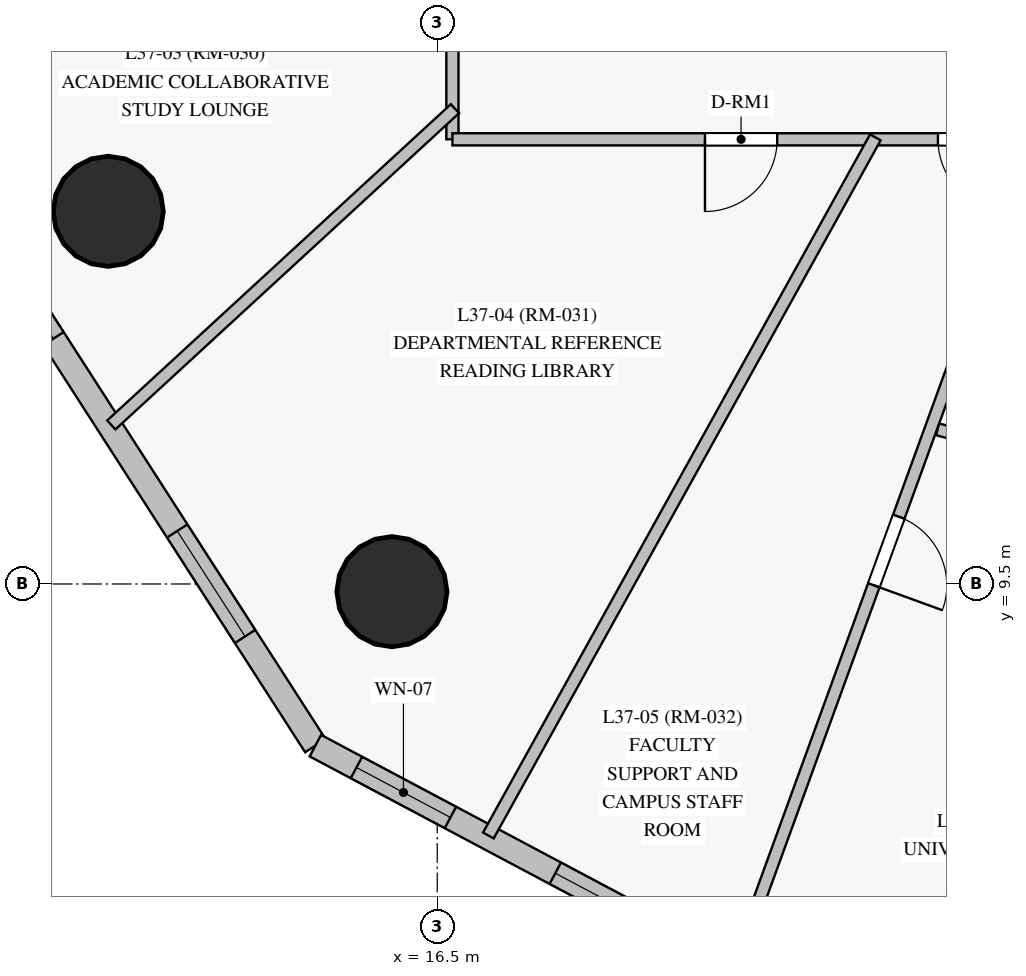
"""IFC4 building model, lengths in metres.
Left out: names, types, materials, properties, quantities, classifications, styles, units other than length and angle.
Written with IfcOpenShell. Run it as: python <this file> out.ifc"""

import sys

from ifc_helpers import new_model, si_unit, direction, frame, frame_2d, origin, origin_with_axes, origin_2d, place, context, subcontext, project, spatial, rectangle, circle, extrude, source, transform, mapped, element, fill, save


model = new_model("IFC4")
c1 = context("Model", 3, precision=1e-05, world=origin(), true_north=direction((0.0, 1.0)))
c2 = subcontext(c1, "Body", "Model", "MODEL_VIEW")
j1 = project(units=[si_unit("LENGTHUNIT", "METRE"), si_unit("PLANEANGLEUNIT", "RADIAN")], contexts=[c1])
p1 = place(None, origin())
s1 = spatial("IfcSite", under=j1, at=p1, CompositionType="ELEMENT")
p2 = place(p1, origin())
s2 = spatial("IfcBuilding", under=s1, at=p2, CompositionType="ELEMENT")
p3 = place(p2, frame((0.0, 0.0, 132.8)))
s3 = spatial("IfcBuildingStorey", under=s2, at=p3, CompositionType="ELEMENT", Elevation=132.8)
m1 = source(origin_with_axes(), c2, "Body", "SweptSolid", [
    extrude(circle(Radius=0.725, at=origin_2d()), origin(), (0.0, 0.0, 1.0), 3.05),
])
for number, where, z_axis, x_axis in (
    (1, (12.172, 14.403, 0.0), (0.0, 0.0, 1.0), (1.0, 0.0, 0.0)),
    (2, (15.904, 9.399, 0.0), (0.0, 0.0, 1.0), (1.0, 0.0, 0.0)),
):
    element("IfcColumn", number, at=place(p3, frame(where, z_axis=z_axis, x_axis=x_axis)), inside=s3, PredefinedType="COLUMN", context=c2, shape_type="MappedRepresentation", body=[
        mapped(m1, transform((0.0, 0.0, 0.0), scale=1.0)),
    ])
p4 = place(p3, frame((9.789, 15.31, 0.0), z_axis=(0.0, 0.0, 1.0), x_axis=(0.541166732634, -0.840915315291, 0.0)))
e3 = element("IfcWall", 3, at=p4, inside=s3, PredefinedType="SOLIDWALL", context=c2, shape_type="SweptSolid", body=[
    extrude(rectangle(XDim=9.438, YDim=0.32, at=frame_2d((4.719, 0.0))), origin(), (0.0, 0.0, 1.0), 2.825),
])
p5 = place(p4, frame((1.421, 0.0, 0.85)))
e4 = element("IfcOpeningElement", 4, at=p5, cuts=e3, PredefinedType="OPENING", context=c2, shape_type="SweptSolid", body=[
    extrude(rectangle(XDim=1.65, YDim=1.65, at=frame_2d((0.825, 0.825))), frame((0.0, 0.17, 0.0), z_axis=(0.0, -1.0, 0.0), x_axis=(1.0, 0.0, 0.0)), (0.0, 0.0, 1.0), 0.34),
])
p6 = place(p4, frame((6.08, 0.0, 0.85)))
e5 = element("IfcOpeningElement", 5, at=p6, cuts=e3, PredefinedType="OPENING", context=c2, shape_type="SweptSolid", body=[
    extrude(rectangle(XDim=1.65, YDim=1.65, at=frame_2d((0.825, 0.825))), frame((0.0, 0.17, 0.0), z_axis=(0.0, -1.0, 0.0), x_axis=(1.0, 0.0, 0.0)), (0.0, 0.0, 1.0), 0.34),
])
p7 = place(p3, frame((14.897, 7.373, 0.0), z_axis=(0.0, 0.0, 1.0), x_axis=(0.882958227075, -0.469451562188, 0.0)))
e6 = element("IfcWall", 6, at=p7, inside=s3, PredefinedType="SOLIDWALL", context=c2, shape_type="SweptSolid", body=[
    extrude(rectangle(XDim=11.765, YDim=0.32, at=frame_2d((5.883, 0.0))), origin(), (0.0, 0.0, 1.0), 2.825),
])
p8 = place(p7, frame((0.613, 0.0, 0.85)))
e7 = element("IfcOpeningElement", 7, at=p8, cuts=e6, PredefinedType="OPENING", context=c2, shape_type="SweptSolid", body=[
    extrude(rectangle(XDim=1.4, YDim=1.65, at=frame_2d((0.7, 0.825))), frame((0.0, 0.17, 0.0), z_axis=(0.0, -1.0, 0.0), x_axis=(1.0, 0.0, 0.0)), (0.0, 0.0, 1.0), 0.34),
])
p9 = place(p7, frame((3.575, 0.0, 0.85)))
e8 = element("IfcOpeningElement", 8, at=p9, cuts=e6, PredefinedType="OPENING", context=c2, shape_type="SweptSolid", body=[
    extrude(rectangle(XDim=1.65, YDim=1.65, at=frame_2d((0.825, 0.825))), frame((0.0, 0.17, 0.0), z_axis=(0.0, -1.0, 0.0), x_axis=(1.0, 0.0, 0.0)), (0.0, 0.0, 1.0), 0.34),
])
p10 = place(p7, frame((8.145, 0.0, 0.85)))
e9 = element("IfcOpeningElement", 9, at=p10, cuts=e6, PredefinedType="OPENING", context=c2, shape_type="SweptSolid", body=[
    extrude(rectangle(XDim=1.65, YDim=1.65, at=frame_2d((0.825, 0.825))), frame((0.0, 0.17, 0.0), z_axis=(0.0, -1.0, 0.0), x_axis=(1.0, 0.0, 0.0)), (0.0, 0.0, 1.0), 0.34),
])
p11 = place(p3, frame((16.7, 15.35, 0.0), z_axis=(0.0, 0.0, 1.0), x_axis=(0.0, 1.0, 0.0)))
e10 = element("IfcWall", 10, at=p11, inside=s3, PredefinedType="PARTITIONING", context=c2, shape_type="SweptSolid", body=[
    extrude(rectangle(XDim=22.3, YDim=0.16, at=frame_2d((11.15, 0.0))), origin(), (0.0, 0.0, 1.0), 2.225),
])
p12 = place(p11, frame((10.135, 0.0, 0.0)))
e11 = element("IfcOpeningElement", 11, at=p12, cuts=e10, PredefinedType="OPENING", context=c2, shape_type="SweptSolid", body=[
    extrude(rectangle(XDim=0.96, YDim=2.15, at=frame_2d((0.48, 1.075))), frame((0.0, 0.09, 0.0), z_axis=(0.0, -1.0, 0.0), x_axis=(1.0, 0.0, 0.0)), (0.0, 0.0, 1.0), 0.18),
])
p13 = place(p11, frame((2.104, 0.0, 0.0)))
e12 = element("IfcOpeningElement", 12, at=p13, cuts=e10, PredefinedType="OPENING", context=c2, shape_type="SweptSolid", body=[
    extrude(rectangle(XDim=0.95, YDim=2.15, at=frame_2d((0.475, 1.075))), frame((0.0, 0.09, 0.0), z_axis=(0.0, -1.0, 0.0), x_axis=(1.0, 0.0, 0.0)), (0.0, 0.0, 1.0), 0.18),
])
p14 = place(p11, frame((14.02, 0.0, 0.0)))
e13 = element("IfcOpeningElement", 13, at=p14, cuts=e10, PredefinedType="OPENING", context=c2, shape_type="SweptSolid", body=[
    extrude(rectangle(XDim=0.95, YDim=2.15, at=frame_2d((0.475, 1.075))), frame((0.0, 0.09, 0.0), z_axis=(0.0, -1.0, 0.0), x_axis=(1.0, 0.0, 0.0)), (0.0, 0.0, 1.0), 0.18),
])
p15 = place(p3, frame((24.389, 15.378, 0.0), z_axis=(0.0, 0.0, 1.0), x_axis=(-0.341952384899, -0.93971728007, 0.0)))
e14 = element("IfcWall", 14, at=p15, inside=s3, PredefinedType="PARTITIONING", context=c2, shape_type="SweptSolid", body=[
    extrude(rectangle(XDim=11.612, YDim=0.16, at=frame_2d((5.806, 0.0))), origin(), (0.0, 0.0, 1.0), 2.825),
])
p16 = place(p15, frame((5.313, 0.0, 0.0)))
e15 = element("IfcOpeningElement", 15, at=p16, cuts=e14, PredefinedType="OPENING", context=c2, shape_type="SweptSolid", body=[
    extrude(rectangle(XDim=0.96, YDim=2.15, at=frame_2d((0.48, 1.075))), frame((0.0, 0.09, 0.0), z_axis=(0.0, -1.0, 0.0), x_axis=(1.0, 0.0, 0.0)), (0.0, 0.0, 1.0), 0.18),
])
p17 = place(p3, frame((27.55, 15.35, 0.0), z_axis=(0.0, 0.0, 1.0), x_axis=(-1.0, 0.0, 0.0)))
e16 = element("IfcWall", 16, at=p17, inside=s3, PredefinedType="PARTITIONING", context=c2, shape_type="SweptSolid", body=[
    extrude(rectangle(XDim=10.85, YDim=0.16, at=frame_2d((5.425, 0.0))), origin(), (0.0, 0.0, 1.0), 2.325),
])
p18 = place(p17, frame((6.577, 0.0, 0.0)))
e17 = element("IfcOpeningElement", 17, at=p18, cuts=e16, PredefinedType="OPENING", context=c2, shape_type="SweptSolid", body=[
    extrude(rectangle(XDim=0.95, YDim=2.15, at=frame_2d((0.475, 1.075))), frame((0.0, 0.09, 0.0), z_axis=(0.0, -1.0, 0.0), x_axis=(1.0, 0.0, 0.0)), (0.0, 0.0, 1.0), 0.18),
])
p19 = place(p17, frame((3.512, 0.0, 0.0)))
e18 = element("IfcOpeningElement", 18, at=p19, cuts=e16, PredefinedType="OPENING", context=c2, shape_type="SweptSolid", body=[
    extrude(rectangle(XDim=0.95, YDim=2.15, at=frame_2d((0.475, 1.075))), frame((0.0, 0.09, 0.0), z_axis=(0.0, -1.0, 0.0), x_axis=(1.0, 0.0, 0.0)), (0.0, 0.0, 1.0), 0.18),
])
p20 = place(p17, frame((1.948, 0.0, 0.0)))
e19 = element("IfcOpeningElement", 19, at=p20, cuts=e16, PredefinedType="OPENING", context=c2, shape_type="SweptSolid", body=[
    extrude(rectangle(XDim=0.95, YDim=2.15, at=frame_2d((0.475, 1.075))), frame((0.0, 0.09, 0.0), z_axis=(0.0, -1.0, 0.0), x_axis=(1.0, 0.0, 0.0)), (0.0, 0.0, 1.0), 0.18),
])
p21 = place(p3, frame((22.265, 15.376, 0.0), z_axis=(0.0, 0.0, 1.0), x_axis=(-0.484869000513, -0.874586789485, 0.0)))
e20 = element("IfcWall", 20, at=p21, inside=s3, PredefinedType="PARTITIONING", context=c2, shape_type="SweptSolid", body=[
    extrude(rectangle(XDim=10.502, YDim=0.16, at=frame_2d((5.251, 0.0))), origin(), (0.0, 0.0, 1.0), 2.825),
])
p22 = place(p3, frame((16.733, 15.753, 0.0), z_axis=(0.0, 0.0, 1.0), x_axis=(-0.73584309599, -0.677152078992, 0.0)))
e21 = element("IfcWall", 21, at=p22, inside=s3, PredefinedType="PARTITIONING", context=c2, shape_type="SweptSolid", body=[
    extrude(rectangle(XDim=6.144, YDim=0.16, at=frame_2d((3.072, 0.0))), origin(), (0.0, 0.0, 1.0), 2.825),
])
p23 = place(p3, frame((27.579, 10.33, 0.0), z_axis=(0.0, 0.0, 1.0), x_axis=(-0.965933068413, 0.258792015614, 0.0)))
e22 = element("IfcWall", 22, at=p23, inside=s3, PredefinedType="PARTITIONING", context=c2, shape_type="SweptSolid", body=[
    extrude(rectangle(XDim=4.655, YDim=0.16, at=frame_2d((2.327, 0.0))), origin(), (0.0, 0.0, 1.0), 2.825),
])
m2 = source(origin_with_axes(), c2, "Body", "SweptSolid", [
    extrude(rectangle(XDim=1.65, YDim=1.65, at=frame_2d((0.825, 0.825))), frame((0.0, 0.03, 0.0), z_axis=(0.0, -1.0, 0.0), x_axis=(1.0, 0.0, 0.0)), (0.0, 0.0, 1.0), 0.06),
])
p24 = place(p5, origin())
e23 = element("IfcWindow", 23, at=p24, inside=s3, PartitioningType="SINGLE_PANEL", PredefinedType="WINDOW", context=c2, shape_type="MappedRepresentation", body=[
    mapped(m2, transform((0.0, 0.0, 0.0), scale=1.0)),
])
fill(e4, e23)
p25 = place(p6, origin())
e24 = element("IfcWindow", 24, at=p25, inside=s3, PartitioningType="SINGLE_PANEL", PredefinedType="WINDOW", context=c2, shape_type="MappedRepresentation", body=[
    mapped(m2, transform((0.0, 0.0, 0.0), scale=1.0)),
])
fill(e5, e24)
m3 = source(origin_with_axes(), c2, "Body", "SweptSolid", [
    extrude(rectangle(XDim=1.4, YDim=1.65, at=frame_2d((0.7, 0.825))), frame((0.0, 0.03, 0.0), z_axis=(0.0, -1.0, 0.0), x_axis=(1.0, 0.0, 0.0)), (0.0, 0.0, 1.0), 0.06),
])
p26 = place(p8, origin())
e25 = element("IfcWindow", 25, at=p26, inside=s3, PartitioningType="SINGLE_PANEL", PredefinedType="WINDOW", context=c2, shape_type="MappedRepresentation", body=[
    mapped(m3, transform((0.0, 0.0, 0.0), scale=1.0)),
])
fill(e7, e25)
p27 = place(p9, origin())
e26 = element("IfcWindow", 26, at=p27, inside=s3, PartitioningType="SINGLE_PANEL", PredefinedType="WINDOW", context=c2, shape_type="MappedRepresentation", body=[
    mapped(m2, transform((0.0, 0.0, 0.0), scale=1.0)),
])
fill(e8, e26)
m4 = source(origin_with_axes(), c2, "Body", "SweptSolid", [
    extrude(rectangle(XDim=0.95, YDim=2.15, at=frame_2d((0.475, 1.075))), frame((0.0, 0.025, 0.0), z_axis=(0.0, -1.0, 0.0), x_axis=(1.0, 0.0, 0.0)), (0.0, 0.0, 1.0), 0.05),
])
p28 = place(p18, origin())
e27 = element("IfcDoor", 27, at=p28, inside=s3, OperationType="SINGLE_SWING_RIGHT", PredefinedType="DOOR", context=c2, shape_type="MappedRepresentation", body=[
    mapped(m4, transform((0.0, 0.0, 0.0), scale=1.0)),
])
fill(e17, e27)
p29 = place(p19, origin())
e28 = element("IfcDoor", 28, at=p29, inside=s3, OperationType="SINGLE_SWING_LEFT", PredefinedType="DOOR", context=c2, shape_type="MappedRepresentation", body=[
    mapped(m4, transform((0.0, 0.0, 0.0), scale=1.0)),
])
fill(e18, e28)
m5 = source(origin_with_axes(), c2, "Body", "SweptSolid", [
    extrude(rectangle(XDim=0.96, YDim=2.15, at=frame_2d((0.48, 1.075))), frame((0.0, 0.025, 0.0), z_axis=(0.0, -1.0, 0.0), x_axis=(1.0, 0.0, 0.0)), (0.0, 0.0, 1.0), 0.05),
])
p30 = place(p16, origin())
e29 = element("IfcDoor", 29, at=p30, inside=s3, OperationType="SINGLE_SWING_RIGHT", PredefinedType="DOOR", context=c2, shape_type="MappedRepresentation", body=[
    mapped(m5, transform((0.0, 0.0, 0.0), scale=1.0)),
])
fill(e15, e29)
save(model, sys.argv[1])
